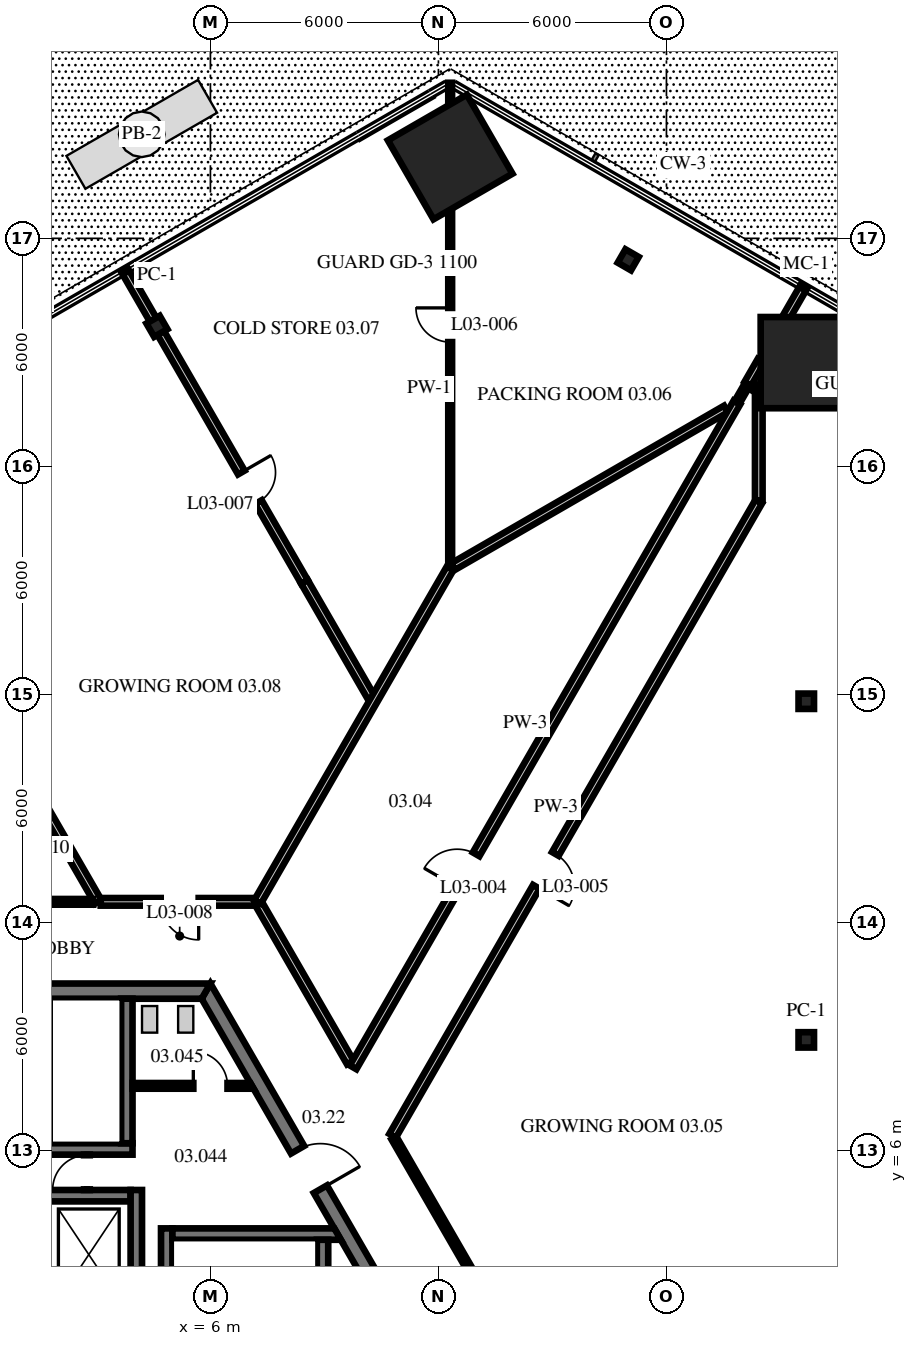
"""IFC4 building model, lengths in metres.
Left out: names, types, materials, properties, quantities, classifications, styles, units other than length and angle.
Written with IfcOpenShell. Run it as: python <this file> out.ifc"""

import sys

from ifc_helpers import new_model, si_unit, direction, frame, frame_2d, origin, origin_2d, place, context, subcontext, project, spatial, polyline, rectangle, i_section, outline, extrude, source, transform, mapped, element, fill, save


model = new_model("IFC4")
c1 = context("Model", 3, precision=1e-05, world=origin(), true_north=direction((0.0, 1.0)))
c2 = subcontext(c1, "Body", "Model", "MODEL_VIEW")
j1 = project(units=[si_unit("LENGTHUNIT", "METRE"), si_unit("PLANEANGLEUNIT", "RADIAN")], contexts=[c1])
p1 = place(None, origin())
s1 = spatial("IfcSite", under=j1, at=p1, CompositionType="ELEMENT")
p2 = place(p1, origin())
s2 = spatial("IfcBuilding", under=s1, at=p2, CompositionType="ELEMENT")
p3 = place(p2, frame((0.0, 0.0, 16.0)))
s3 = spatial("IfcBuildingStorey", under=s2, at=p3, CompositionType="ELEMENT", Elevation=16.0)
m1 = source(origin(), c2, "Body", "SweptSolid", [
    extrude(i_section(OverallWidth=0.404, OverallDepth=0.406, WebThickness=0.027, FlangeThickness=0.044, at=origin_2d()), origin(), (0.0, 0.0, 1.0), 4.3),
])
for number, where, z_axis, x_axis in (
    (1, (21.679, 8.91, 0.0), (0.0, 0.0, 1.0), (0.0, 1.0, 0.0)),
    (2, (21.679, 17.82, 0.0), (0.0, 0.0, 1.0), (0.0, 1.0, 0.0)),
):
    element("IfcColumn", number, at=place(p3, frame(where, z_axis=z_axis, x_axis=x_axis)), inside=s3, PredefinedType="COLUMN", context=c2, shape_type="MappedRepresentation", body=[
        mapped(m1, transform((0.0, 0.0, 0.0), scale=1.0)),
    ])
m2 = source(origin(), c2, "Body", "SweptSolid", [
    extrude(rectangle(XDim=2.4, YDim=2.4, at=origin_2d()), origin(), (0.0, 0.0, 1.0), 4.3),
])
p4 = place(p3, frame((21.679, 26.73, 0.0), z_axis=(0.0, 0.0, 1.0), x_axis=(0.0, 1.0, 0.0)))
e3 = element("IfcColumn", 3, at=p4, inside=s3, PredefinedType="COLUMN", context=c2, shape_type="MappedRepresentation", body=[
    mapped(m2, transform((0.0, 0.0, 0.0), scale=1.0)),
])
p5 = place(p3, frame((16.994, 29.435, 0.0), z_axis=(0.0, 0.0, 1.0), x_axis=(-0.866026276448, 0.4999984885, 0.0)))
e4 = element("IfcColumn", 4, at=p5, inside=s3, PredefinedType="COLUMN", context=c2, shape_type="MappedRepresentation", body=[
    mapped(m1, transform((0.0, 0.0, 0.0), scale=1.0)),
])
p6 = place(p3, frame((12.309, 32.14, 0.0), z_axis=(0.0, 0.0, 1.0), x_axis=(-0.866025403784, -0.5, 0.0)))
e5 = element("IfcColumn", 5, at=p6, inside=s3, PredefinedType="COLUMN", context=c2, shape_type="MappedRepresentation", body=[
    mapped(m2, transform((0.0, 0.0, 0.0), scale=1.0)),
])
p7 = place(p3, frame((4.593, 27.685, 0.0), z_axis=(0.0, 0.0, 1.0), x_axis=(-0.866025403784, -0.5, 0.0)))
e6 = element("IfcColumn", 6, at=p7, inside=s3, PredefinedType="COLUMN", context=c2, shape_type="MappedRepresentation", body=[
    mapped(m1, transform((0.0, 0.0, 0.0), scale=1.0)),
])
m3 = source(origin(), c2, "Body", "SweptSolid", [
    extrude(outline(polyline([(-0.115, -0.2), (11.885, -0.2), (11.654, 0.2), (0.115, 0.2), (-0.115, -0.2)])), origin(), (0.0, 0.0, 1.0), 4.1),
])
p8 = place(p3, frame((11.769, 0.0, 0.0), z_axis=(0.0, 0.0, 1.0), x_axis=(-0.499996592174, 0.866027371285, 0.0)))
e7 = element("IfcWall", 7, at=p8, inside=s3, PredefinedType="SHEAR", context=c2, shape_type="MappedRepresentation", body=[
    mapped(m3, transform((0.0, 0.0, 0.0), scale=1.0)),
])
p9 = place(p8, frame((5.75, 0.0, 0.0)))
e8 = element("IfcOpeningElement", 8, at=p9, cuts=e7, PredefinedType="OPENING", context=c2, shape_type="SweptSolid", body=[
    extrude(rectangle(XDim=1.2, YDim=2.1, at=frame_2d((0.6, 1.05))), frame((0.0, 0.21, 0.0), z_axis=(0.0, -1.0, 0.0), x_axis=(1.0, 0.0, 0.0)), (0.0, 0.0, 1.0), 0.42),
])
p10 = place(p3, frame((5.885, 10.192, 0.0), z_axis=(0.0, 0.0, 1.0), x_axis=(-1.0, 0.0, 0.0)))
e9 = element("IfcWall", 9, at=p10, inside=s3, PredefinedType="SHEAR", context=c2, shape_type="MappedRepresentation", body=[
    mapped(m3, transform((0.0, 0.0, 0.0), scale=1.0)),
])
p11 = place(p10, frame((7.985, 0.0, 0.0)))
e10 = element("IfcOpeningElement", 10, at=p11, cuts=e9, PredefinedType="OPENING", context=c2, shape_type="SweptSolid", body=[
    extrude(rectangle(XDim=1.2, YDim=2.1, at=frame_2d((0.6, 1.05))), frame((0.0, 0.21, 0.0), z_axis=(0.0, -1.0, 0.0), x_axis=(1.0, 0.0, 0.0)), (0.0, 0.0, 1.0), 0.42),
])
m4 = source(origin(), c2, "Body", "SweptSolid", [
    extrude(rectangle(XDim=2.5, YDim=0.3, at=frame_2d((1.25, 0.0))), origin(), (0.0, 0.0, 1.0), 4.1),
])
p12 = place(p3, frame((1.4, 4.81, 0.0), z_axis=(0.0, 0.0, 1.0), x_axis=(1.0, 0.0, 0.0)))
e11 = element("IfcWall", 11, at=p12, inside=s3, PredefinedType="SHEAR", context=c2, shape_type="MappedRepresentation", body=[
    mapped(m4, transform((0.0, 0.0, 0.0), scale=1.0)),
])
m5 = source(origin(), c2, "Body", "SweptSolid", [
    extrude(rectangle(XDim=2.9, YDim=0.3, at=frame_2d((1.45, 0.0))), origin(), (0.0, 0.0, 1.0), 4.1),
])
p13 = place(p3, frame((4.05, 2.06, 0.0), z_axis=(0.0, 0.0, 1.0), x_axis=(0.0, 1.0, 0.0)))
e12 = element("IfcWall", 12, at=p13, inside=s3, PredefinedType="SHEAR", context=c2, shape_type="MappedRepresentation", body=[
    mapped(m5, transform((0.0, 0.0, 0.0), scale=1.0)),
])
m6 = source(origin(), c2, "Body", "SweptSolid", [
    extrude(outline(polyline([(-0.15, -0.15), (9.99, -0.15), (9.99, 0.15), (0.15, 0.15), (-0.15, -0.15)])), origin(), (0.0, 0.0, 1.0), 4.1),
])
p14 = place(p3, frame((4.85, -6.04, 0.0), z_axis=(0.0, 0.0, 1.0), x_axis=(0.0, 1.0, 0.0)))
e13 = element("IfcWall", 13, at=p14, inside=s3, PredefinedType="SHEAR", context=c2, shape_type="MappedRepresentation", body=[
    mapped(m6, transform((0.0, 0.0, 0.0), scale=1.0)),
])
p15 = place(p14, frame((3.19, 0.0, 0.0)))
e14 = element("IfcOpeningElement", 14, at=p15, cuts=e13, PredefinedType="OPENING", context=c2, shape_type="SweptSolid", body=[
    extrude(rectangle(XDim=1.1, YDim=2.1, at=frame_2d((0.55, 1.05))), frame((0.0, 0.16, 0.0), z_axis=(0.0, -1.0, 0.0), x_axis=(1.0, 0.0, 0.0)), (0.0, 0.0, 1.0), 0.32),
])
m7 = source(origin(), c2, "Body", "SweptSolid", [
    extrude(outline(polyline([(0.0, -0.15), (0.0, 0.15), (4.26, 0.15), (4.433, -0.15), (0.0, -0.15)])), origin(), (0.0, 0.0, 1.0), 4.1),
])
p16 = place(p3, frame((5.0, 3.8, 0.0), z_axis=(0.0, 0.0, 1.0), x_axis=(1.0, 0.0, 0.0)))
e15 = element("IfcWall", 15, at=p16, inside=s3, PredefinedType="SHEAR", context=c2, shape_type="MappedRepresentation", body=[
    mapped(m7, transform((0.0, 0.0, 0.0), scale=1.0)),
])
m8 = source(origin(), c2, "Body", "SweptSolid", [
    extrude(rectangle(XDim=7.3, YDim=0.3, at=frame_2d((3.65, 0.0))), origin(), (0.0, 0.0, 1.0), 4.1),
])
p17 = place(p3, frame((8.95, -3.65, 0.0), z_axis=(0.0, 0.0, 1.0), x_axis=(0.0, 1.0, 0.0)))
e16 = element("IfcWall", 16, at=p17, inside=s3, PredefinedType="SHEAR", context=c2, shape_type="MappedRepresentation", body=[
    mapped(m8, transform((0.0, 0.0, 0.0), scale=1.0)),
])
m9 = source(origin(), c2, "Body", "SweptSolid", [
    extrude(rectangle(XDim=7.9, YDim=0.3, at=frame_2d((3.95, 0.0))), origin(), (0.0, 0.0, 1.0), 4.1),
])
p18 = place(p3, frame((-3.95, 6.04, 0.0), z_axis=(0.0, 0.0, 1.0), x_axis=(1.0, 0.0, 0.0)))
e17 = element("IfcWall", 17, at=p18, inside=s3, PredefinedType="SHEAR", context=c2, shape_type="MappedRepresentation", body=[
    mapped(m9, transform((0.0, 0.0, 0.0), scale=1.0)),
])
m10 = source(origin(), c2, "Body", "SweptSolid", [
    extrude(outline(polyline([(0.0, -0.15), (0.0, 0.15), (3.804, 0.15), (3.804, -0.15), (0.0, -0.15)])), origin(), (0.0, 0.0, 1.0), 4.1),
])
p19 = place(p3, frame((3.8, 6.19, 0.0), z_axis=(0.0, 0.0, 1.0), x_axis=(0.0, 1.0, 0.0)))
e18 = element("IfcWall", 18, at=p19, inside=s3, PredefinedType="SHEAR", context=c2, shape_type="MappedRepresentation", body=[
    mapped(m10, transform((0.0, 0.0, 0.0), scale=1.0)),
])
p20 = place(p3, frame((3.95, 7.7, 0.0), z_axis=(0.0, 0.0, 1.0), x_axis=(1.0, 0.0, 0.0)))
e19 = element("IfcWall", 19, at=p20, inside=s3, PredefinedType="PARTITIONING", context=c2, shape_type="SweptSolid", body=[
    extrude(outline(polyline([(0.0, -0.075), (0.0, 0.075), (3.102, 0.075), (3.188, -0.075), (0.0, -0.075)])), origin(), (0.0, 0.0, 1.0), 4.1),
])
p21 = place(p20, frame((1.6, 0.0, 0.0)))
e20 = element("IfcOpeningElement", 20, at=p21, cuts=e19, PredefinedType="OPENING", context=c2, shape_type="SweptSolid", body=[
    extrude(rectangle(XDim=0.9, YDim=2.1, at=frame_2d((0.45, 1.05))), frame((0.0, 0.085, 0.0), z_axis=(0.0, -1.0, 0.0), x_axis=(1.0, 0.0, 0.0)), (0.0, 0.0, 1.0), 0.17),
])
p22 = place(p3, frame((2.75, 4.96, 0.0), z_axis=(0.0, 0.0, 1.0), x_axis=(0.0, 1.0, 0.0)))
e21 = element("IfcWall", 21, at=p22, inside=s3, PredefinedType="PARTITIONING", context=c2, shape_type="SweptSolid", body=[
    extrude(rectangle(XDim=0.93, YDim=0.15, at=frame_2d((0.465, 0.0))), origin(), (0.0, 0.0, 1.0), 4.1),
])
p23 = place(p22, frame((0.015, 0.0, 0.0)))
e22 = element("IfcOpeningElement", 22, at=p23, cuts=e21, PredefinedType="OPENING", context=c2, shape_type="SweptSolid", body=[
    extrude(rectangle(XDim=0.9, YDim=2.1, at=frame_2d((0.45, 1.05))), frame((0.0, 0.085, 0.0), z_axis=(0.0, -1.0, 0.0), x_axis=(1.0, 0.0, 0.0)), (0.0, 0.0, 1.0), 0.17),
])
m11 = source(origin(), c2, "Body", "SweptSolid", [
    extrude(rectangle(XDim=12.148, YDim=0.2, at=frame_2d((6.074, 0.0))), origin(), (0.0, 0.0, 1.0), 3.343),
])
p24 = place(p3, frame((-3.027, 23.063, 0.0), z_axis=(0.0, 0.0, 1.0), x_axis=(0.499997320042, -0.866026951053, 0.0)))
e23 = element("IfcWall", 23, at=p24, inside=s3, PredefinedType="PARTITIONING", context=c2, shape_type="MappedRepresentation", body=[
    mapped(m11, transform((0.0, 0.0, 0.0), scale=1.0)),
])
p25 = place(p3, frame((7.276, 12.482, 0.0), z_axis=(0.0, 0.0, 1.0), x_axis=(0.500043273698, -0.866000418262, 0.0)))
e24 = element("IfcWall", 24, at=p25, inside=s3, PredefinedType="PARTITIONING", context=c2, shape_type="SweptSolid", body=[
    extrude(rectangle(XDim=4.809, YDim=0.2, at=frame_2d((2.404, 0.0))), origin(), (0.0, 0.0, 1.0), 4.1),
])
p26 = place(p3, frame((10.83, 6.327, 0.0), z_axis=(0.0, 0.0, 1.0), x_axis=(0.500005980693, -0.866021950802, 0.0)))
e25 = element("IfcWall", 25, at=p26, inside=s3, PredefinedType="PARTITIONING", context=c2, shape_type="SweptSolid", body=[
    extrude(rectangle(XDim=5.392, YDim=0.15, at=frame_2d((2.696, 0.0))), origin(), (0.0, 0.0, 1.0), 4.1),
])
m12 = source(origin(), c2, "Body", "SweptSolid", [
    extrude(rectangle(XDim=1.499, YDim=0.2, at=frame_2d((0.749, 0.0))), origin(), (0.0, 0.0, 1.0), 4.1),
])
p27 = place(p3, frame((3.747, 29.15, 0.0), z_axis=(0.0, 0.0, 1.0), x_axis=(0.499976292358, -0.866039090965, 0.0)))
e26 = element("IfcWall", 26, at=p27, inside=s3, PredefinedType="PARTITIONING", context=c2, shape_type="MappedRepresentation", body=[
    mapped(m12, transform((0.0, 0.0, 0.0), scale=1.0)),
])
m13 = source(origin(), c2, "Body", "SweptSolid", [
    extrude(rectangle(XDim=7.568, YDim=0.2, at=frame_2d((3.784, 0.0))), origin(), (0.0, 0.0, 1.0), 3.488),
])
p28 = place(p3, frame((4.689, 27.518, 0.0), z_axis=(0.0, 0.0, 1.0), x_axis=(0.499997032024, -0.866027117339, 0.0)))
e27 = element("IfcWall", 27, at=p28, inside=s3, PredefinedType="PARTITIONING", context=c2, shape_type="MappedRepresentation", body=[
    mapped(m13, transform((0.0, 0.0, 0.0), scale=1.0)),
])
p29 = place(p28, frame((4.248, 0.0, 0.0)))
e28 = element("IfcOpeningElement", 28, at=p29, cuts=e27, PredefinedType="OPENING", context=c2, shape_type="SweptSolid", body=[
    extrude(rectangle(XDim=0.9, YDim=2.1, at=frame_2d((0.45, 1.05))), frame((0.0, 0.11, 0.0), z_axis=(0.0, -1.0, 0.0), x_axis=(1.0, 0.0, 0.0)), (0.0, 0.0, 1.0), 0.22),
])
p30 = place(p3, frame((8.474, 20.963, 0.0), z_axis=(0.0, 0.0, 1.0), x_axis=(0.500009718699, -0.866019792618, 0.0)))
e29 = element("IfcWall", 29, at=p30, inside=s3, PredefinedType="PARTITIONING", context=c2, shape_type="SweptSolid", body=[
    extrude(rectangle(XDim=3.629, YDim=0.2, at=frame_2d((1.815, 0.0))), origin(), (0.0, 0.0, 1.0), 4.1),
])
p31 = place(p3, frame((20.21, 26.135, 0.0), z_axis=(0.0, 0.0, 1.0), x_axis=(0.865608577882, -0.500721269667, 0.0)))
e30 = element("IfcWall", 30, at=p31, inside=s3, PredefinedType="PARTITIONING", context=c2, shape_type="SweptSolid", body=[
    extrude(rectangle(XDim=0.183, YDim=0.2, at=frame_2d((0.092, 0.0))), origin(), (0.0, 0.0, 1.0), 4.1),
])
p32 = place(p3, frame((-5.33, 12.542, 0.0), z_axis=(0.0, 0.0, 1.0), x_axis=(1.0, 0.0, 0.0)))
e31 = element("IfcWall", 31, at=p32, inside=s3, PredefinedType="PARTITIONING", context=c2, shape_type="SweptSolid", body=[
    extrude(rectangle(XDim=8.244, YDim=0.15, at=frame_2d((4.122, 0.0))), origin(), (0.0, 0.0, 1.0), 4.1),
])
p33 = place(p32, frame((3.727, 0.0, 0.0)))
e32 = element("IfcOpeningElement", 32, at=p33, cuts=e31, PredefinedType="OPENING", context=c2, shape_type="SweptSolid", body=[
    extrude(rectangle(XDim=0.9, YDim=2.1, at=frame_2d((0.45, 1.05))), frame((0.0, 0.085, 0.0), z_axis=(0.0, -1.0, 0.0), x_axis=(1.0, 0.0, 0.0)), (0.0, 0.0, 1.0), 0.17),
])
p34 = place(p3, frame((3.114, 12.542, 0.0), z_axis=(0.0, 0.0, 1.0), x_axis=(1.0, 0.0, 0.0)))
e33 = element("IfcWall", 33, at=p34, inside=s3, PredefinedType="PARTITIONING", context=c2, shape_type="SweptSolid", body=[
    extrude(rectangle(XDim=4.058, YDim=0.2, at=frame_2d((2.029, 0.0))), origin(), (0.0, 0.0, 1.0), 4.1),
])
p35 = place(p34, frame((1.578, 0.0, 0.0)))
e34 = element("IfcOpeningElement", 34, at=p35, cuts=e33, PredefinedType="OPENING", context=c2, shape_type="SweptSolid", body=[
    extrude(rectangle(XDim=1.0, YDim=2.1, at=frame_2d((0.5, 1.05))), frame((0.0, 0.11, 0.0), z_axis=(0.0, -1.0, 0.0), x_axis=(1.0, 0.0, 0.0)), (0.0, 0.0, 1.0), 0.22),
])
p36 = place(p3, frame((12.387, 21.365, 0.0), z_axis=(0.0, 0.0, 1.0), x_axis=(0.866019818373, 0.500009674092, 0.0)))
e35 = element("IfcWall", 35, at=p36, inside=s3, PredefinedType="PARTITIONING", context=c2, shape_type="SweptSolid", body=[
    extrude(rectangle(XDim=8.29, YDim=0.2, at=frame_2d((4.145, 0.0))), origin(), (0.0, 0.0, 1.0), 4.1),
])
p37 = place(p3, frame((10.795, 6.387, 0.0), z_axis=(0.0, 0.0, 1.0), x_axis=(0.499994080432, 0.866028821422, 0.0)))
e36 = element("IfcWall", 36, at=p37, inside=s3, PredefinedType="PARTITIONING", context=c2, shape_type="SweptSolid", body=[
    extrude(rectangle(XDim=19.269, YDim=0.2, at=frame_2d((9.635, 0.0))), origin(), (0.0, 0.0, 1.0), 4.1),
])
p38 = place(p37, frame((7.563, 0.0, 0.0)))
e37 = element("IfcOpeningElement", 37, at=p38, cuts=e36, PredefinedType="OPENING", context=c2, shape_type="SweptSolid", body=[
    extrude(rectangle(XDim=1.0, YDim=2.1, at=frame_2d((0.5, 1.05))), frame((0.0, 0.11, 0.0), z_axis=(0.0, -1.0, 0.0), x_axis=(1.0, 0.0, 0.0)), (0.0, 0.0, 1.0), 0.22),
])
p39 = place(p3, frame((9.755, 8.188, 0.0), z_axis=(0.0, 0.0, 1.0), x_axis=(0.500007734453, 0.86602093825, 0.0)))
e38 = element("IfcWall", 38, at=p39, inside=s3, PredefinedType="PARTITIONING", context=c2, shape_type="SweptSolid", body=[
    extrude(rectangle(XDim=20.199, YDim=0.2, at=frame_2d((10.1, 0.0))), origin(), (0.0, 0.0, 1.0), 4.1),
])
p40 = place(p39, frame((5.473, 0.0, 0.0)))
e39 = element("IfcOpeningElement", 39, at=p40, cuts=e38, PredefinedType="OPENING", context=c2, shape_type="SweptSolid", body=[
    extrude(rectangle(XDim=1.0, YDim=2.1, at=frame_2d((0.5, 1.05))), frame((0.0, 0.11, 0.0), z_axis=(0.0, -1.0, 0.0), x_axis=(1.0, 0.0, 0.0)), (0.0, 0.0, 1.0), 0.22),
])
p41 = place(p3, frame((19.855, 25.68, 0.0), z_axis=(0.0, 0.0, 1.0), x_axis=(0.500427620203, 0.86577837634, 0.0)))
e40 = element("IfcWall", 40, at=p41, inside=s3, PredefinedType="PARTITIONING", context=c2, shape_type="SweptSolid", body=[
    extrude(rectangle(XDim=0.569, YDim=0.15, at=frame_2d((0.285, 0.0))), origin(), (0.0, 0.0, 1.0), 4.1),
])
p42 = place(p3, frame((20.14, 26.173, 0.0), z_axis=(0.0, 0.0, 1.0), x_axis=(0.49989369433, 0.866086770693, 0.0)))
e41 = element("IfcWall", 41, at=p42, inside=s3, PredefinedType="PARTITIONING", context=c2, shape_type="SweptSolid", body=[
    extrude(rectangle(XDim=0.699, YDim=0.2, at=frame_2d((0.35, 0.0))), origin(), (0.0, 0.0, 1.0), 4.1),
])
p43 = place(p3, frame((21.148, 27.92, 0.0), z_axis=(0.0, 0.0, 1.0), x_axis=(0.499935264145, 0.866062775822, 0.0)))
e42 = element("IfcWall", 42, at=p43, inside=s3, PredefinedType="PARTITIONING", context=c2, shape_type="SweptSolid", body=[
    extrude(rectangle(XDim=0.927, YDim=0.2, at=frame_2d((0.463, 0.0))), origin(), (0.0, 0.0, 1.0), 4.1),
])
p44 = place(p3, frame((7.241, 12.542, 0.0), z_axis=(0.0, 0.0, 1.0), x_axis=(0.49999906822, 0.866025941747, 0.0)))
e43 = element("IfcWall", 43, at=p44, inside=s3, PredefinedType="PARTITIONING", context=c2, shape_type="SweptSolid", body=[
    extrude(rectangle(XDim=10.136, YDim=0.2, at=frame_2d((5.068, 0.0))), origin(), (0.0, 0.0, 1.0), 4.1),
])
p45 = place(p3, frame((20.429, 23.105, 0.0), z_axis=(0.0, 0.0, 1.0), x_axis=(0.0, 1.0, 0.0)))
e44 = element("IfcWall", 44, at=p45, inside=s3, PredefinedType="PARTITIONING", context=c2, shape_type="SweptSolid", body=[
    extrude(rectangle(XDim=2.903, YDim=0.2, at=frame_2d((1.452, 0.0))), origin(), (0.0, 0.0, 1.0), 4.1),
])
p46 = place(p3, frame((12.309, 21.33, 0.0), z_axis=(0.0, 0.0, 1.0), x_axis=(0.0, 1.0, 0.0)))
e45 = element("IfcWall", 45, at=p46, inside=s3, PredefinedType="PARTITIONING", context=c2, shape_type="SweptSolid", body=[
    extrude(rectangle(XDim=9.436, YDim=0.1, at=frame_2d((4.718, 0.0))), origin(), (0.0, 0.0, 1.0), 4.1),
])
p47 = place(p46, frame((5.94, 0.0, 0.0)))
e46 = element("IfcOpeningElement", 46, at=p47, cuts=e45, PredefinedType="OPENING", context=c2, shape_type="SweptSolid", body=[
    extrude(rectangle(XDim=0.9, YDim=2.1, at=frame_2d((0.45, 1.05))), frame((0.0, 0.06, 0.0), z_axis=(0.0, -1.0, 0.0), x_axis=(1.0, 0.0, 0.0)), (0.0, 0.0, 1.0), 0.12),
])
p48 = place(p3, frame((12.309, 33.514, 0.0), z_axis=(0.0, 0.0, 1.0), x_axis=(0.0, 1.0, 0.0)))
e47 = element("IfcWall", 47, at=p48, inside=s3, PredefinedType="PARTITIONING", context=c2, shape_type="SweptSolid", body=[
    extrude(rectangle(XDim=0.579, YDim=0.1, at=frame_2d((0.29, 0.0))), origin(), (0.0, 0.0, 1.0), 4.1),
])
p49 = place(p9, frame((1.2, 0.0, 0.0), z_axis=(0.0, 0.0, 1.0), x_axis=(-1.0, 0.0, 0.0)))
e48 = element("IfcDoor", 48, at=p49, inside=s3, OperationType="SINGLE_SWING_RIGHT", PredefinedType="DOOR", context=c2, shape_type="SweptSolid", body=[
    extrude(rectangle(XDim=1.2, YDim=2.1, at=frame_2d((0.6, 1.05))), frame((0.0, 0.025, 0.0), z_axis=(0.0, -1.0, 0.0), x_axis=(1.0, 0.0, 0.0)), (0.0, 0.0, 1.0), 0.05),
])
fill(e8, e48)
p50 = place(p23, origin())
e49 = element("IfcDoor", 49, at=p50, inside=s3, OperationType="SINGLE_SWING_LEFT", PredefinedType="DOOR", context=c2, shape_type="SweptSolid", body=[
    extrude(rectangle(XDim=0.9, YDim=2.1, at=frame_2d((0.45, 1.05))), frame((0.0, 0.025, 0.0), z_axis=(0.0, -1.0, 0.0), x_axis=(1.0, 0.0, 0.0)), (0.0, 0.0, 1.0), 0.05),
])
fill(e22, e49)
p51 = place(p21, origin())
e50 = element("IfcDoor", 50, at=p51, inside=s3, OperationType="SINGLE_SWING_LEFT", PredefinedType="DOOR", context=c2, shape_type="SweptSolid", body=[
    extrude(rectangle(XDim=0.9, YDim=2.1, at=frame_2d((0.45, 1.05))), frame((0.0, 0.025, 0.0), z_axis=(0.0, -1.0, 0.0), x_axis=(1.0, 0.0, 0.0)), (0.0, 0.0, 1.0), 0.05),
])
fill(e20, e50)
p52 = place(p40, origin())
e51 = element("IfcDoor", 51, at=p52, inside=s3, OperationType="SINGLE_SWING_LEFT", PredefinedType="DOOR", context=c2, shape_type="SweptSolid", body=[
    extrude(rectangle(XDim=1.0, YDim=2.1, at=frame_2d((0.5, 1.05))), frame((0.0, 0.025, 0.0), z_axis=(0.0, -1.0, 0.0), x_axis=(1.0, 0.0, 0.0)), (0.0, 0.0, 1.0), 0.05),
])
fill(e39, e51)
p53 = place(p38, origin())
e52 = element("IfcDoor", 52, at=p53, inside=s3, OperationType="SINGLE_SWING_RIGHT", PredefinedType="DOOR", context=c2, shape_type="SweptSolid", body=[
    extrude(rectangle(XDim=1.0, YDim=2.1, at=frame_2d((0.5, 1.05))), frame((0.0, 0.025, 0.0), z_axis=(0.0, -1.0, 0.0), x_axis=(1.0, 0.0, 0.0)), (0.0, 0.0, 1.0), 0.05),
])
fill(e37, e52)
p54 = place(p47, origin())
e53 = element("IfcDoor", 53, at=p54, inside=s3, OperationType="SINGLE_SWING_LEFT", PredefinedType="DOOR", context=c2, shape_type="SweptSolid", body=[
    extrude(rectangle(XDim=0.9, YDim=2.1, at=frame_2d((0.45, 1.05))), frame((0.0, 0.025, 0.0), z_axis=(0.0, -1.0, 0.0), x_axis=(1.0, 0.0, 0.0)), (0.0, 0.0, 1.0), 0.05),
])
fill(e46, e53)
p55 = place(p29, origin())
e54 = element("IfcDoor", 54, at=p55, inside=s3, OperationType="SINGLE_SWING_LEFT", PredefinedType="DOOR", context=c2, shape_type="SweptSolid", body=[
    extrude(rectangle(XDim=0.9, YDim=2.1, at=frame_2d((0.45, 1.05))), frame((0.0, 0.025, 0.0), z_axis=(0.0, -1.0, 0.0), x_axis=(1.0, 0.0, 0.0)), (0.0, 0.0, 1.0), 0.05),
])
fill(e28, e54)
p56 = place(p35, origin())
e55 = element("IfcDoor", 55, at=p56, inside=s3, OperationType="SINGLE_SWING_RIGHT", PredefinedType="DOOR", context=c2, shape_type="SweptSolid", body=[
    extrude(rectangle(XDim=1.0, YDim=2.1, at=frame_2d((0.5, 1.05))), frame((0.0, 0.025, 0.0), z_axis=(0.0, -1.0, 0.0), x_axis=(1.0, 0.0, 0.0)), (0.0, 0.0, 1.0), 0.05),
])
fill(e34, e55)
save(model, sys.argv[1])
